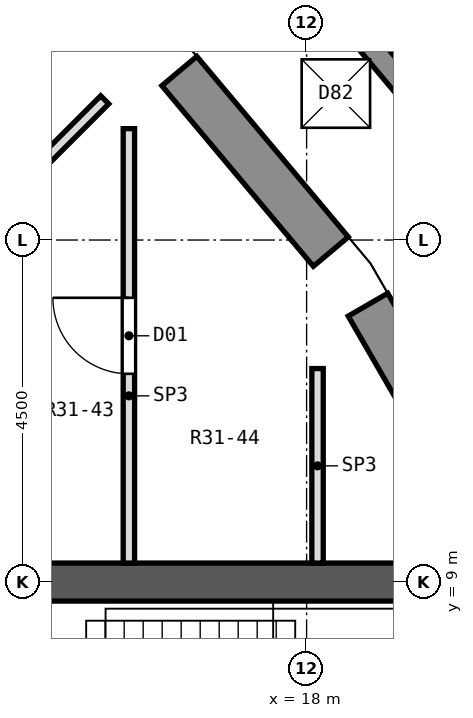
"""IFC4 building model, lengths in metres.
Left out: names, types, materials, properties, quantities, classifications, styles, units other than length and angle.
Written with IfcOpenShell. Run it as: python <this file> out.ifc"""

import sys

from ifc_helpers import new_model, si_unit, direction, frame, frame_2d, origin, origin_2d, place, context, subcontext, project, spatial, rectangle, hollow_rectangle, extrude, element, fill, save


model = new_model("IFC4")
c1 = context("Model", 3, precision=1e-05, world=origin(), true_north=direction((0.0, 1.0)))
c2 = subcontext(c1, "Body", "Model", "MODEL_VIEW")
j1 = project(units=[si_unit("LENGTHUNIT", "METRE"), si_unit("PLANEANGLEUNIT", "RADIAN")], contexts=[c1])
p1 = place(None, origin())
s1 = spatial("IfcSite", under=j1, at=p1, CompositionType="ELEMENT")
p2 = place(p1, origin())
s2 = spatial("IfcBuilding", under=s1, at=p2, CompositionType="ELEMENT")
p3 = place(p2, frame((0.0, 0.0, 220.2)))
s3 = spatial("IfcBuildingStorey", under=s2, at=p3, CompositionType="ELEMENT", Elevation=220.2)
p4 = place(p3, frame((19.741, 13.823, 0.196), z_axis=(-0.401353278691, -0.281066923483, 0.871732143613), x_axis=(0.573626190743, -0.819117203636, 0.0)))
e1 = element("IfcColumn", 1, at=p4, inside=s3, PredefinedType="COLUMN", context=c2, shape_type="SweptSolid", body=[
    extrude(hollow_rectangle(XDim=0.8, YDim=0.8, WallThickness=0.05, at=origin_2d()), origin(), (0.0, 0.0, 1.0), 4.082),
])
p5 = place(p3, frame((17.041, 17.041, 0.196), z_axis=(-0.346495601837, -0.346495601837, 0.871711876605), x_axis=(0.707106781187, -0.707106781187, 0.0)))
e2 = element("IfcColumn", 2, at=p5, inside=s3, PredefinedType="COLUMN", context=c2, shape_type="SweptSolid", body=[
    extrude(hollow_rectangle(XDim=0.8, YDim=0.8, WallThickness=0.05, at=origin_2d()), origin(), (0.0, 0.0, 1.0), 4.082),
])
p6 = place(p3, frame((13.5, 9.0, 0.0), z_axis=(0.0, 0.0, 1.0), x_axis=(1.0, 0.0, 0.0)))
e3 = element("IfcWall", 3, at=p6, inside=s3, PredefinedType="SHEAR", context=c2, shape_type="SweptSolid", body=[
    extrude(rectangle(XDim=6.0, YDim=0.5, at=frame_2d((3.0, 0.0))), origin(), (0.0, 0.0, 1.0), 4.5),
])
for number, where, z_axis, x_axis in (
    (4, (20.358, 9.963, 0.0), (0.0, 0.0, 1.0), (-0.5, 0.866, 0.0)),
    (5, (18.319, 13.347, 0.0), (0.0, 0.0, 1.0), (-0.643, 0.766, 0.0)),
):
    element("IfcWall", number, at=place(p3, frame(where, z_axis=z_axis, x_axis=x_axis)), inside=s3, PredefinedType="SOLIDWALL", context=c2, shape_type="SweptSolid", body=[
        extrude(rectangle(XDim=3.101, YDim=0.6, at=frame_2d((1.551, 0.0))), origin(), (0.0, 0.0, 1.0), 3.95),
    ])
p7 = place(p3, frame((20.364, 14.243, 0.0), z_axis=(0.0, 0.0, 1.0), x_axis=(-0.642792594925, 0.76604025998, 0.0)))
e6 = element("IfcWall", 6, at=p7, inside=s3, PredefinedType="PARAPET", context=c2, shape_type="SweptSolid", body=[
    extrude(rectangle(XDim=4.358, YDim=0.3, at=frame_2d((2.179, 0.0))), origin(), (0.0, 0.0, 1.0), 1.1),
])
p8 = place(p3, frame((9.13, 9.13, 0.0), z_axis=(0.0, 0.0, 1.0), x_axis=(0.707106781187, 0.707106781187, 0.0)))
e7 = element("IfcWall", 7, at=p8, inside=s3, PredefinedType="PARTITIONING", context=c2, shape_type="SweptSolid", body=[
    extrude(rectangle(XDim=8.788, YDim=0.15, at=frame_2d((4.394, 0.0))), origin(), (0.0, 0.0, 1.0), 3.95),
])
p9 = place(p3, frame((18.144, 9.25, 0.0), z_axis=(0.0, 0.0, 1.0), x_axis=(0.0, 1.0, 0.0)))
e8 = element("IfcWall", 8, at=p9, inside=s3, PredefinedType="PARTITIONING", context=c2, shape_type="SweptSolid", body=[
    extrude(rectangle(XDim=2.559, YDim=0.15, at=frame_2d((1.28, 0.0))), origin(), (0.0, 0.0, 1.0), 3.95),
])
p10 = place(p3, frame((15.662, 9.25, 0.0), z_axis=(0.0, 0.0, 1.0), x_axis=(0.0, 1.0, 0.0)))
e9 = element("IfcWall", 9, at=p10, inside=s3, PredefinedType="PARTITIONING", context=c2, shape_type="SweptSolid", body=[
    extrude(rectangle(XDim=5.715, YDim=0.15, at=frame_2d((2.857, 0.0))), origin(), (0.0, 0.0, 1.0), 3.95),
])
p11 = place(p10, frame((2.49, 0.0, 0.0)))
e10 = element("IfcOpeningElement", 10, at=p11, cuts=e9, PredefinedType="OPENING", context=c2, shape_type="SweptSolid", body=[
    extrude(rectangle(XDim=1.0, YDim=2.1, at=frame_2d((0.5, 1.05))), frame((0.0, 0.087, 0.0), z_axis=(0.0, -1.0, 0.0), x_axis=(1.0, 0.0, 0.0)), (0.0, 0.0, 1.0), 0.174),
])
p12 = place(p3, frame((0.0, 0.0, -0.6)))
p13 = place(p12, frame((18.385, 15.427, 0.0)))
p14 = place(p13, frame((0.0, 0.0, 0.55)))
e11 = element("IfcDoor", 11, at=p14, inside=s3, OperationType="SINGLE_SWING_LEFT", PredefinedType="TRAPDOOR", context=c2, shape_type="SweptSolid", body=[
    extrude(rectangle(XDim=0.9, YDim=0.9, at=origin_2d()), origin(), (0.0, 0.0, 1.0), 0.05),
])
p15 = place(p11, origin())
e12 = element("IfcDoor", 12, at=p15, inside=s3, OperationType="SINGLE_SWING_RIGHT", PredefinedType="DOOR", context=c2, shape_type="SweptSolid", body=[
    extrude(rectangle(XDim=1.0, YDim=2.1, at=frame_2d((0.5, 1.05))), frame((0.0, 0.025, 0.0), z_axis=(0.0, -1.0, 0.0), x_axis=(1.0, 0.0, 0.0)), (0.0, 0.0, 1.0), 0.05),
])
fill(e10, e12)
save(model, sys.argv[1])
